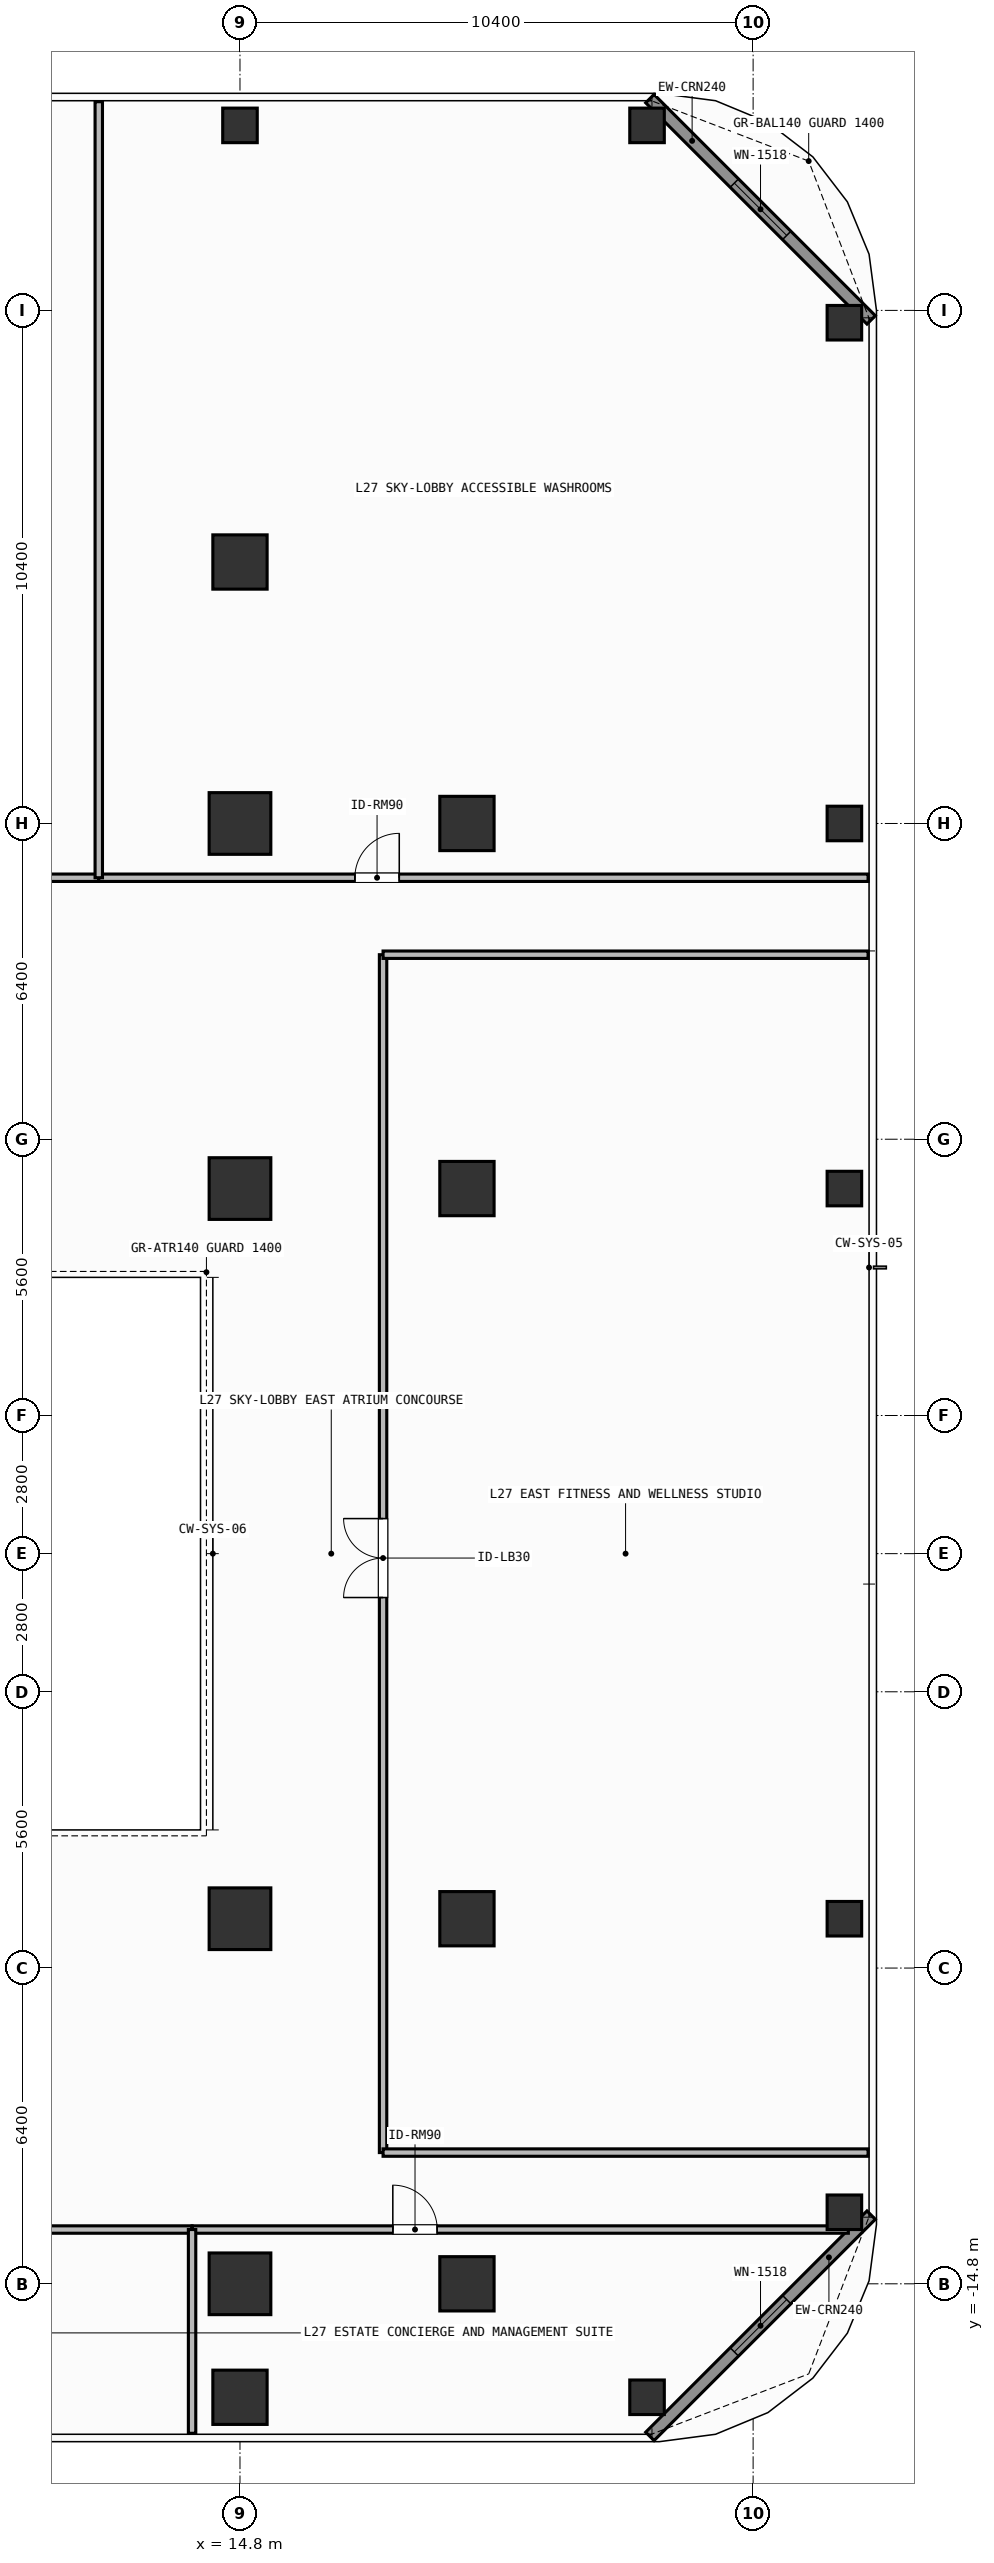
"""IFC4 building model, lengths in metres.
Left out: names, types, materials, properties, quantities, classifications, styles, units other than length and angle.
Written with IfcOpenShell. Run it as: python <this file> out.ifc"""

import sys

from ifc_helpers import new_model, si_unit, direction, frame, frame_2d, origin, origin_2d, place, context, subcontext, project, spatial, rectangle, hollow_rectangle, extrude, element, fill, save


model = new_model("IFC4")
c1 = context("Model", 3, precision=1e-05, world=origin(), true_north=direction((0.0, 1.0)))
c2 = subcontext(c1, "Body", "Model", "MODEL_VIEW")
j1 = project(units=[si_unit("LENGTHUNIT", "METRE"), si_unit("PLANEANGLEUNIT", "RADIAN")], contexts=[c1])
p1 = place(None, origin())
s1 = spatial("IfcSite", under=j1, at=p1, CompositionType="ELEMENT")
p2 = place(p1, origin())
s2 = spatial("IfcBuilding", under=s1, at=p2, CompositionType="ELEMENT")
p3 = place(p2, frame((0.0, 0.0, 108.6)))
s3 = spatial("IfcBuildingStorey", under=s2, at=p3, CompositionType="ELEMENT", Elevation=108.6)
for number, where, z_axis, x_axis in (
    (1, (14.8, -14.8, 0.0), (0.0, 0.0, 1.0), (1.0, 0.0, 0.0)),
    (2, (14.8, 14.8, 0.0), (0.0, 0.0, 1.0), (1.0, 0.0, 0.0)),
    (3, (14.8, -7.4, 0.0), (0.0, 0.0, 1.0), (1.0, 0.0, 0.0)),
    (4, (14.8, 7.4, 0.0), (0.0, 0.0, 1.0), (1.0, 0.0, 0.0)),
):
    element("IfcColumn", number, at=place(p3, frame(where, z_axis=z_axis, x_axis=x_axis)), inside=s3, PredefinedType="COLUMN", context=c2, shape_type="SweptSolid", body=[
        extrude(rectangle(XDim=1.25, YDim=1.25, at=origin_2d()), origin(), (0.0, 0.0, 1.0), 4.8),
    ])
for number, where, z_axis, x_axis in (
    (5, (19.4, -14.8, 0.0), (0.0, 0.0, 1.0), (1.0, 0.0, 0.0)),
    (6, (19.4, -7.4, 0.0), (0.0, 0.0, 1.0), (1.0, 0.0, 0.0)),
    (7, (19.4, 7.4, 0.0), (0.0, 0.0, 1.0), (1.0, 0.0, 0.0)),
    (8, (19.4, 14.8, 0.0), (0.0, 0.0, 1.0), (1.0, 0.0, 0.0)),
    (9, (14.8, -17.1, 0.0), (0.0, 0.0, 1.0), (1.0, 0.0, 0.0)),
    (10, (14.8, 20.1, 0.0), (0.0, 0.0, 1.0), (1.0, 0.0, 0.0)),
):
    element("IfcColumn", number, at=place(p3, frame(where, z_axis=z_axis, x_axis=x_axis)), inside=s3, PredefinedType="COLUMN", context=c2, shape_type="SweptSolid", body=[
        extrude(rectangle(XDim=1.1, YDim=1.1, at=origin_2d()), origin(), (0.0, 0.0, 1.0), 4.8),
    ])
for number, where, z_axis, x_axis in (
    (11, (23.05, -17.1, 0.0), (0.0, 0.0, 1.0), (1.0, 0.0, 0.0)),
    (12, (23.05, 28.95, 0.0), (0.0, 0.0, 1.0), (1.0, 0.0, 0.0)),
    (13, (27.05, -13.35, 0.0), (0.0, 0.0, 1.0), (1.0, 0.0, 0.0)),
    (14, (27.05, 24.95, 0.0), (0.0, 0.0, 1.0), (1.0, 0.0, 0.0)),
    (15, (14.8, 28.95, 0.0), (0.0, 0.0, 1.0), (1.0, 0.0, 0.0)),
    (16, (27.05, -7.4, 0.0), (0.0, 0.0, 1.0), (1.0, 0.0, 0.0)),
    (17, (27.05, 7.4, 0.0), (0.0, 0.0, 1.0), (1.0, 0.0, 0.0)),
    (18, (27.05, 14.8, 0.0), (0.0, 0.0, 1.0), (1.0, 0.0, 0.0)),
):
    element("IfcColumn", number, at=place(p3, frame(where, z_axis=z_axis, x_axis=x_axis)), inside=s3, PredefinedType="COLUMN", context=c2, shape_type="SweptSolid", body=[
        extrude(hollow_rectangle(XDim=0.7, YDim=0.7, WallThickness=0.032, at=origin_2d()), origin(), (0.0, 0.0, 1.0), 4.8),
    ])
p4 = place(p3, frame((23.108, 29.492, 0.0), z_axis=(0.0, 0.0, 1.0), x_axis=(0.707087534163, -0.707126027686, 0.0)))
e19 = element("IfcWall", 19, at=p4, inside=s3, PredefinedType="SOLIDWALL", context=c2, shape_type="SweptSolid", body=[
    extrude(rectangle(XDim=6.342, YDim=0.24, at=frame_2d((3.171, 0.0))), origin(), (0.0, 0.0, 1.0), 4.58),
])
p5 = place(p4, frame((2.421, 0.0, 0.8)))
e20 = element("IfcOpeningElement", 20, at=p5, cuts=e19, PredefinedType="OPENING", context=c2, shape_type="SweptSolid", body=[
    extrude(rectangle(XDim=1.5, YDim=1.85, at=frame_2d((0.75, 0.925))), frame((0.0, 0.13, 0.0), z_axis=(0.0, -1.0, 0.0), x_axis=(1.0, 0.0, 0.0)), (0.0, 0.0, 1.0), 0.26),
])
p6 = place(p3, frame((27.592, -13.408, 0.0), z_axis=(0.0, 0.0, 1.0), x_axis=(-0.707106781187, -0.707106781187, 0.0)))
e21 = element("IfcWall", 21, at=p6, inside=s3, PredefinedType="SOLIDWALL", context=c2, shape_type="SweptSolid", body=[
    extrude(rectangle(XDim=6.342, YDim=0.24, at=frame_2d((3.171, 0.0))), origin(), (0.0, 0.0, 1.0), 4.58),
])
p7 = place(p6, frame((2.421, 0.0, 0.8)))
e22 = element("IfcOpeningElement", 22, at=p7, cuts=e21, PredefinedType="OPENING", context=c2, shape_type="SweptSolid", body=[
    extrude(rectangle(XDim=1.5, YDim=1.85, at=frame_2d((0.75, 0.925))), frame((0.0, 0.13, 0.0), z_axis=(0.0, -1.0, 0.0), x_axis=(1.0, 0.0, 0.0)), (0.0, 0.0, 1.0), 0.26),
])
p8 = place(p3, frame((1.063, 13.7, 0.0), z_axis=(0.0, 0.0, 1.0), x_axis=(1.0, 0.0, 0.0)))
e23 = element("IfcWall", 23, at=p8, inside=s3, PredefinedType="PARTITIONING", context=c2, shape_type="SweptSolid", body=[
    extrude(rectangle(XDim=10.875, YDim=0.15, at=frame_2d((5.438, 0.0))), origin(), (0.0, 0.0, 1.0), 4.58),
])
p9 = place(p8, frame((3.921, 0.0, 0.0)))
e24 = element("IfcOpeningElement", 24, at=p9, cuts=e23, PredefinedType="OPENING", context=c2, shape_type="SweptSolid", body=[
    extrude(rectangle(XDim=1.6, YDim=2.3, at=frame_2d((0.8, 1.15))), frame((0.0, 0.085, 0.0), z_axis=(0.0, -1.0, 0.0), x_axis=(1.0, 0.0, 0.0)), (0.0, 0.0, 1.0), 0.17),
])
p10 = place(p3, frame((11.938, 13.7, 0.0), z_axis=(0.0, 0.0, 1.0), x_axis=(1.0, 0.0, 0.0)))
e25 = element("IfcWall", 25, at=p10, inside=s3, PredefinedType="PARTITIONING", context=c2, shape_type="SweptSolid", body=[
    extrude(rectangle(XDim=15.592, YDim=0.15, at=frame_2d((7.796, 0.0))), origin(), (0.0, 0.0, 1.0), 4.58),
])
p11 = place(p10, frame((5.19, 0.0, 0.0)))
e26 = element("IfcOpeningElement", 26, at=p11, cuts=e25, PredefinedType="OPENING", context=c2, shape_type="SweptSolid", body=[
    extrude(rectangle(XDim=0.9, YDim=2.1, at=frame_2d((0.45, 1.05))), frame((0.0, 0.085, 0.0), z_axis=(0.0, -1.0, 0.0), x_axis=(1.0, 0.0, 0.0)), (0.0, 0.0, 1.0), 0.17),
])
p12 = place(p3, frame((-1.774, -13.7, 0.0), z_axis=(0.0, 0.0, 1.0), x_axis=(1.0, 0.0, 0.0)))
e27 = element("IfcWall", 27, at=p12, inside=s3, PredefinedType="PARTITIONING", context=c2, shape_type="SweptSolid", body=[
    extrude(rectangle(XDim=15.603, YDim=0.15, at=frame_2d((7.802, 0.0))), origin(), (0.0, 0.0, 1.0), 4.58),
])
p13 = place(p12, frame((7.352, 0.0, 0.0)))
e28 = element("IfcOpeningElement", 28, at=p13, cuts=e27, PredefinedType="OPENING", context=c2, shape_type="SweptSolid", body=[
    extrude(rectangle(XDim=0.9, YDim=2.1, at=frame_2d((0.45, 1.05))), frame((0.0, 0.085, 0.0), z_axis=(0.0, -1.0, 0.0), x_axis=(1.0, 0.0, 0.0)), (0.0, 0.0, 1.0), 0.17),
])
p14 = place(p3, frame((13.829, -13.7, 0.0), z_axis=(0.0, 0.0, 1.0), x_axis=(1.0, 0.0, 0.0)))
e29 = element("IfcWall", 29, at=p14, inside=s3, PredefinedType="PARTITIONING", context=c2, shape_type="SweptSolid", body=[
    extrude(rectangle(XDim=13.301, YDim=0.15, at=frame_2d((6.65, 0.0))), origin(), (0.0, 0.0, 1.0), 4.58),
])
p15 = place(p14, frame((4.069, 0.0, 0.0)))
e30 = element("IfcOpeningElement", 30, at=p15, cuts=e29, PredefinedType="OPENING", context=c2, shape_type="SweptSolid", body=[
    extrude(rectangle(XDim=0.9, YDim=2.1, at=frame_2d((0.45, 1.05))), frame((0.0, 0.085, 0.0), z_axis=(0.0, -1.0, 0.0), x_axis=(1.0, 0.0, 0.0)), (0.0, 0.0, 1.0), 0.17),
])
p16 = place(p3, frame((17.7, -12.14, 0.0), z_axis=(0.0, 0.0, 1.0), x_axis=(0.0, 1.0, 0.0)))
e31 = element("IfcWall", 31, at=p16, inside=s3, PredefinedType="PARTITIONING", context=c2, shape_type="SweptSolid", body=[
    extrude(rectangle(XDim=24.28, YDim=0.15, at=frame_2d((12.14, 0.0))), origin(), (0.0, 0.0, 1.0), 4.58),
])
p17 = place(p16, frame((11.25, 0.0, 0.0)))
e32 = element("IfcOpeningElement", 32, at=p17, cuts=e31, PredefinedType="OPENING", context=c2, shape_type="SweptSolid", body=[
    extrude(rectangle(XDim=1.6, YDim=2.3, at=frame_2d((0.8, 1.15))), frame((0.0, 0.085, 0.0), z_axis=(0.0, -1.0, 0.0), x_axis=(1.0, 0.0, 0.0)), (0.0, 0.0, 1.0), 0.17),
])
p18 = place(p3, frame((11.938, 13.7, 0.0), z_axis=(0.0, 0.0, 1.0), x_axis=(0.0, 1.0, 0.0)))
e33 = element("IfcWall", 33, at=p18, inside=s3, PredefinedType="PARTITIONING", context=c2, shape_type="SweptSolid", body=[
    extrude(rectangle(XDim=15.73, YDim=0.15, at=frame_2d((7.865, 0.0))), origin(), (0.0, 0.0, 1.0), 4.58),
])
p19 = place(p3, frame((13.829, -17.83, 0.0), z_axis=(0.0, 0.0, 1.0), x_axis=(0.0, 1.0, 0.0)))
e34 = element("IfcWall", 34, at=p19, inside=s3, PredefinedType="PARTITIONING", context=c2, shape_type="SweptSolid", body=[
    extrude(rectangle(XDim=4.13, YDim=0.15, at=frame_2d((2.065, 0.0))), origin(), (0.0, 0.0, 1.0), 4.58),
])
for number, where, z_axis, x_axis in (
    (35, (17.7, -12.14, 0.0), (0.0, 0.0, 1.0), (1.0, 0.0, 0.0)),
    (36, (17.7, 12.14, 0.0), (0.0, 0.0, 1.0), (1.0, 0.0, 0.0)),
):
    element("IfcWall", number, at=place(p3, frame(where, z_axis=z_axis, x_axis=x_axis)), inside=s3, PredefinedType="PARTITIONING", context=c2, shape_type="SweptSolid", body=[
        extrude(rectangle(XDim=9.83, YDim=0.15, at=frame_2d((4.915, 0.0))), origin(), (0.0, 0.0, 1.0), 4.58),
    ])
p20 = place(p5, origin())
e37 = element("IfcWindow", 37, at=p20, inside=s3, PartitioningType="SINGLE_PANEL", PredefinedType="WINDOW", context=c2, shape_type="SweptSolid", body=[
    extrude(rectangle(XDim=1.5, YDim=1.85, at=frame_2d((0.75, 0.925))), frame((0.0, 0.03, 0.0), z_axis=(0.0, -1.0, 0.0), x_axis=(1.0, 0.0, 0.0)), (0.0, 0.0, 1.0), 0.06),
])
fill(e20, e37)
p21 = place(p7, origin())
e38 = element("IfcWindow", 38, at=p21, inside=s3, PartitioningType="SINGLE_PANEL", PredefinedType="WINDOW", context=c2, shape_type="SweptSolid", body=[
    extrude(rectangle(XDim=1.5, YDim=1.85, at=frame_2d((0.75, 0.925))), frame((0.0, 0.03, 0.0), z_axis=(0.0, -1.0, 0.0), x_axis=(1.0, 0.0, 0.0)), (0.0, 0.0, 1.0), 0.06),
])
fill(e22, e38)
p22 = place(p11, origin())
e39 = element("IfcDoor", 39, at=p22, inside=s3, OperationType="SINGLE_SWING_RIGHT", PredefinedType="DOOR", context=c2, shape_type="SweptSolid", body=[
    extrude(rectangle(XDim=0.9, YDim=2.1, at=frame_2d((0.45, 1.05))), frame((0.0, 0.025, 0.0), z_axis=(0.0, -1.0, 0.0), x_axis=(1.0, 0.0, 0.0)), (0.0, 0.0, 1.0), 0.05),
])
fill(e26, e39)
p23 = place(p15, origin())
e40 = element("IfcDoor", 40, at=p23, inside=s3, OperationType="SINGLE_SWING_LEFT", PredefinedType="DOOR", context=c2, shape_type="SweptSolid", body=[
    extrude(rectangle(XDim=0.9, YDim=2.1, at=frame_2d((0.45, 1.05))), frame((0.0, 0.025, 0.0), z_axis=(0.0, -1.0, 0.0), x_axis=(1.0, 0.0, 0.0)), (0.0, 0.0, 1.0), 0.05),
])
fill(e30, e40)
p24 = place(p17, origin())
e41 = element("IfcDoor", 41, at=p24, inside=s3, OperationType="SINGLE_SWING_LEFT", PredefinedType="DOOR", context=c2, shape_type="SweptSolid", body=[
    extrude(rectangle(XDim=1.6, YDim=2.3, at=frame_2d((0.8, 1.15))), frame((0.0, 0.025, 0.0), z_axis=(0.0, -1.0, 0.0), x_axis=(1.0, 0.0, 0.0)), (0.0, 0.0, 1.0), 0.05),
])
fill(e32, e41)
save(model, sys.argv[1])
